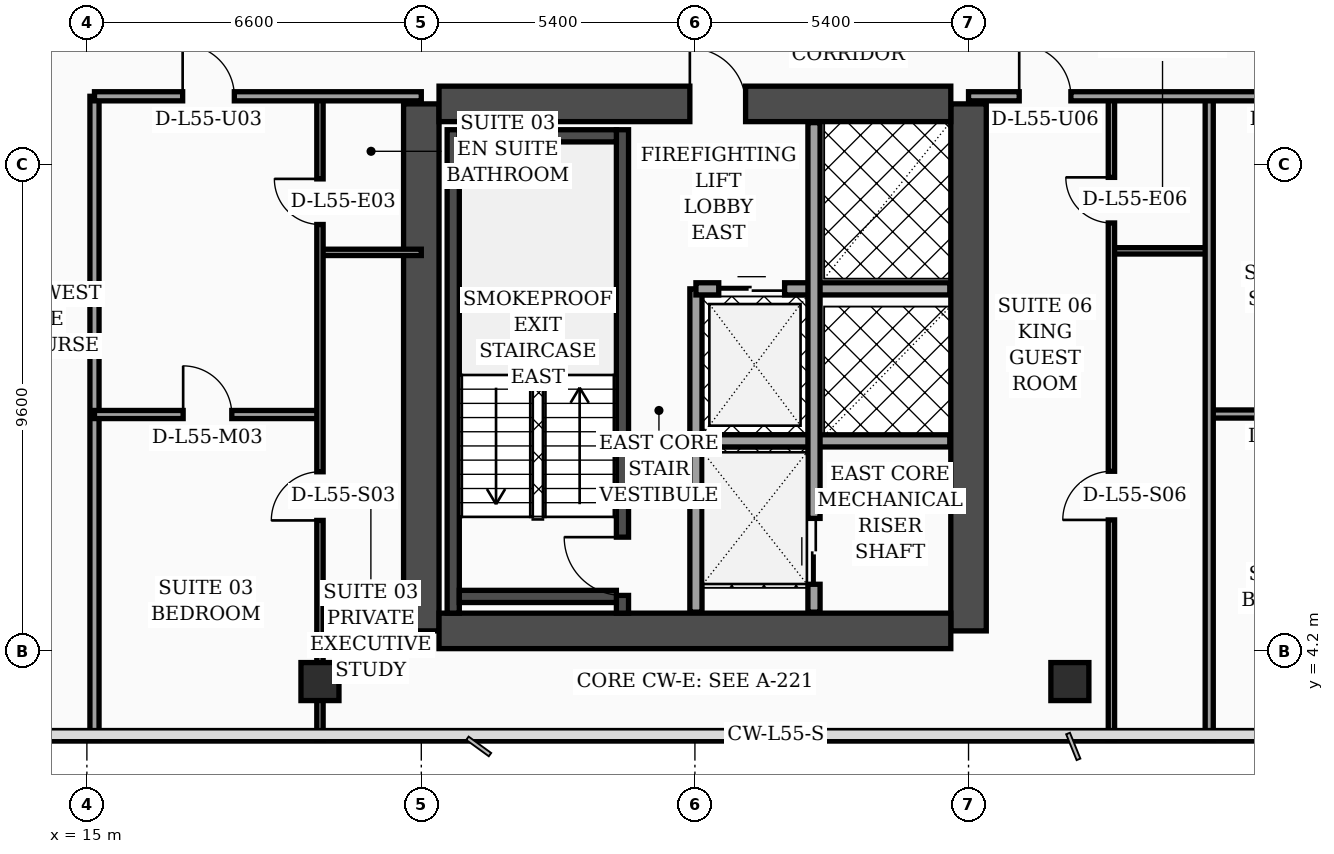
"""IFC4 building model, lengths in metres.
Left out: names, types, materials, properties, quantities, classifications, styles, units other than length and angle.
Written with IfcOpenShell. Run it as: python <this file> out.ifc"""

import sys

from ifc_helpers import new_model, si_unit, direction, frame, frame_2d, origin, origin_2d, place, context, subcontext, project, spatial, rectangle, hollow_rectangle, extrude, element, fill, save


model = new_model("IFC4")
c1 = context("Model", 3, precision=1e-05, world=origin(), true_north=direction((0.0, 1.0)))
c2 = subcontext(c1, "Body", "Model", "MODEL_VIEW")
j1 = project(units=[si_unit("LENGTHUNIT", "METRE"), si_unit("PLANEANGLEUNIT", "RADIAN")], contexts=[c1])
p1 = place(None, origin())
s1 = spatial("IfcSite", under=j1, at=p1, CompositionType="ELEMENT")
p2 = place(p1, origin())
s2 = spatial("IfcBuilding", under=s1, at=p2, CompositionType="ELEMENT")
p3 = place(p2, frame((0.0, 0.0, 223.1)))
s3 = spatial("IfcBuildingStorey", under=s2, at=p3, CompositionType="ELEMENT", Elevation=223.1)
for number, where, z_axis, x_axis in (
    (1, (21.6, 4.6, 0.0), (0.0, 0.0, 1.0), (0.0, 1.0, 0.0)),
    (2, (32.4, 4.6, 0.0), (0.0, 0.0, 1.0), (0.0, 1.0, 0.0)),
):
    element("IfcWall", number, at=place(p3, frame(where, z_axis=z_axis, x_axis=x_axis)), inside=s3, PredefinedType="SHEAR", context=c2, shape_type="SweptSolid", body=[
        extrude(rectangle(XDim=10.4, YDim=0.7, at=frame_2d((5.2, 0.0))), origin(), (0.0, 0.0, 1.0), 3.56),
    ])
p4 = place(p3, frame((21.95, 15.0, 0.0), z_axis=(0.0, 0.0, 1.0), x_axis=(1.0, 0.0, 0.0)))
e3 = element("IfcWall", 3, at=p4, inside=s3, PredefinedType="SHEAR", context=c2, shape_type="SweptSolid", body=[
    extrude(rectangle(XDim=10.1, YDim=0.7, at=frame_2d((5.05, 0.0))), origin(), (0.0, 0.0, 1.0), 3.56),
])
p5 = place(p4, frame((4.95, 0.0, 0.0)))
e4 = element("IfcOpeningElement", 4, at=p5, cuts=e3, PredefinedType="OPENING", context=c2, shape_type="SweptSolid", body=[
    extrude(rectangle(XDim=1.1, YDim=2.2, at=frame_2d((0.55, 1.1))), frame((0.0, 0.36, 0.0), z_axis=(0.0, -1.0, 0.0), x_axis=(1.0, 0.0, 0.0)), (0.0, 0.0, 1.0), 0.72),
])
p6 = place(p3, frame((21.95, 4.6, 0.0), z_axis=(0.0, 0.0, 1.0), x_axis=(1.0, 0.0, 0.0)))
e5 = element("IfcWall", 5, at=p6, inside=s3, PredefinedType="SHEAR", context=c2, shape_type="SweptSolid", body=[
    extrude(rectangle(XDim=10.1, YDim=0.7, at=frame_2d((5.05, 0.0))), origin(), (0.0, 0.0, 1.0), 3.56),
])
p7 = place(p3, frame((22.23, 4.95, 0.0), z_axis=(0.0, 0.0, 1.0), x_axis=(0.0, 1.0, 0.0)))
e6 = element("IfcWall", 6, at=p7, inside=s3, PredefinedType="SOLIDWALL", context=c2, shape_type="SweptSolid", body=[
    extrude(rectangle(XDim=9.54, YDim=0.24, at=frame_2d((4.77, 0.0))), origin(), (0.0, 0.0, 1.0), 3.56),
])
p8 = place(p3, frame((25.57, 4.95, 0.0), z_axis=(0.0, 0.0, 1.0), x_axis=(0.0, 1.0, 0.0)))
e7 = element("IfcWall", 7, at=p8, inside=s3, PredefinedType="SOLIDWALL", context=c2, shape_type="SweptSolid", body=[
    extrude(rectangle(XDim=9.54, YDim=0.24, at=frame_2d((4.77, 0.0))), origin(), (0.0, 0.0, 1.0), 3.56),
])
p9 = place(p8, frame((0.35, 0.0, 0.0)))
e8 = element("IfcOpeningElement", 8, at=p9, cuts=e7, PredefinedType="OPENING", context=c2, shape_type="SweptSolid", body=[
    extrude(rectangle(XDim=1.15, YDim=2.2, at=frame_2d((0.575, 1.1))), frame((0.0, 0.13, 0.0), z_axis=(0.0, -1.0, 0.0), x_axis=(1.0, 0.0, 0.0)), (0.0, 0.0, 1.0), 0.26),
])
for number, where, z_axis, x_axis in (
    (9, (22.35, 5.28, 0.0), (0.0, 0.0, 1.0), (1.0, 0.0, 0.0)),
    (10, (22.35, 14.37, 0.0), (0.0, 0.0, 1.0), (1.0, 0.0, 0.0)),
):
    element("IfcWall", number, at=place(p3, frame(where, z_axis=z_axis, x_axis=x_axis)), inside=s3, PredefinedType="SOLIDWALL", context=c2, shape_type="SweptSolid", body=[
        extrude(rectangle(XDim=3.1, YDim=0.24, at=frame_2d((1.55, 0.0))), origin(), (0.0, 0.0, 1.0), 3.56),
    ])
for number, where, z_axis, x_axis in (
    (11, (19.6, 3.6, 0.0), (0.0, 0.0, 1.0), (1.0, 0.0, 0.0)),
    (12, (34.4, 3.6, 0.0), (0.0, 0.0, 1.0), (1.0, 0.0, 0.0)),
):
    element("IfcColumn", number, at=place(p3, frame(where, z_axis=z_axis, x_axis=x_axis)), inside=s3, PredefinedType="COLUMN", context=c2, shape_type="SweptSolid", body=[
        extrude(hollow_rectangle(XDim=0.75, YDim=0.75, WallThickness=0.032, at=origin_2d()), origin(), (0.0, 0.0, 1.0), 3.56),
    ])
p10 = place(p3, frame((27.02, 4.97, 0.0), z_axis=(0.0, 0.0, 1.0), x_axis=(0.0, 1.0, 0.0)))
e13 = element("IfcWall", 13, at=p10, inside=s3, PredefinedType="SOLIDWALL", context=c2, shape_type="SweptSolid", body=[
    extrude(rectangle(XDim=6.38, YDim=0.24, at=frame_2d((3.19, 0.0))), origin(), (0.0, 0.0, 1.0), 3.56),
])
p11 = place(p3, frame((27.02, 11.35, 0.0), z_axis=(0.0, 0.0, 1.0), x_axis=(1.0, 0.0, 0.0)))
e14 = element("IfcWall", 14, at=p11, inside=s3, PredefinedType="SOLIDWALL", context=c2, shape_type="SweptSolid", body=[
    extrude(rectangle(XDim=5.01, YDim=0.24, at=frame_2d((2.505, 0.0))), origin(), (0.0, 0.0, 1.0), 3.56),
])
p12 = place(p11, frame((0.45, 0.0, 0.0)))
e15 = element("IfcOpeningElement", 15, at=p12, cuts=e14, PredefinedType="OPENING", context=c2, shape_type="SweptSolid", body=[
    extrude(rectangle(XDim=1.3, YDim=2.35, at=frame_2d((0.65, 1.175))), frame((0.0, 0.13, 0.0), z_axis=(0.0, -1.0, 0.0), x_axis=(1.0, 0.0, 0.0)), (0.0, 0.0, 1.0), 0.26),
])
p13 = place(p3, frame((27.02, 8.35, 0.0), z_axis=(0.0, 0.0, 1.0), x_axis=(1.0, 0.0, 0.0)))
e16 = element("IfcWall", 16, at=p13, inside=s3, PredefinedType="SOLIDWALL", context=c2, shape_type="SweptSolid", body=[
    extrude(rectangle(XDim=5.01, YDim=0.24, at=frame_2d((2.505, 0.0))), origin(), (0.0, 0.0, 1.0), 3.56),
])
p14 = place(p3, frame((29.35, 4.97, 0.0), z_axis=(0.0, 0.0, 1.0), x_axis=(0.0, 1.0, 0.0)))
e17 = element("IfcWall", 17, at=p14, inside=s3, PredefinedType="SOLIDWALL", context=c2, shape_type="SweptSolid", body=[
    extrude(rectangle(XDim=9.66, YDim=0.24, at=frame_2d((4.83, 0.0))), origin(), (0.0, 0.0, 1.0), 3.56),
])
p15 = place(p14, frame((0.55, 0.0, 0.0)))
e18 = element("IfcOpeningElement", 18, at=p15, cuts=e17, PredefinedType="OPENING", context=c2, shape_type="SweptSolid", body=[
    extrude(rectangle(XDim=1.3, YDim=2.35, at=frame_2d((0.65, 1.175))), frame((0.0, 0.13, 0.0), z_axis=(0.0, -1.0, 0.0), x_axis=(1.0, 0.0, 0.0)), (0.0, 0.0, 1.0), 0.26),
])
p16 = place(p3, frame((15.15, 2.44, 0.0), z_axis=(0.0, 0.0, 1.0), x_axis=(0.0, 1.0, 0.0)))
e19 = element("IfcWall", 19, at=p16, inside=s3, PredefinedType="PARTITIONING", context=c2, shape_type="SweptSolid", body=[
    extrude(rectangle(XDim=12.71, YDim=0.18, at=frame_2d((6.355, 0.0))), origin(), (0.0, 0.0, 1.0), 3.09),
])
p17 = place(p3, frame((19.6, 12.07, 0.0), z_axis=(0.0, 0.0, 1.0), x_axis=(1.0, 0.0, 0.0)))
e20 = element("IfcWall", 20, at=p17, inside=s3, PredefinedType="PARTITIONING", context=c2, shape_type="SweptSolid", body=[
    extrude(rectangle(XDim=2.0, YDim=0.125, at=frame_2d((1.0, 0.0))), origin(), (0.0, 0.0, 1.0), 3.56),
])
p18 = place(p3, frame((15.15, 8.87, 0.0), z_axis=(0.0, 0.0, 1.0), x_axis=(1.0, 0.0, 0.0)))
e21 = element("IfcWall", 21, at=p18, inside=s3, PredefinedType="PARTITIONING", context=c2, shape_type="SweptSolid", body=[
    extrude(rectangle(XDim=4.45, YDim=0.16, at=frame_2d((2.225, 0.0))), origin(), (0.0, 0.0, 1.0), 3.56),
])
p19 = place(p18, frame((1.75, 0.0, 0.0)))
e22 = element("IfcOpeningElement", 22, at=p19, cuts=e21, PredefinedType="OPENING", context=c2, shape_type="SweptSolid", body=[
    extrude(rectangle(XDim=0.96, YDim=2.2, at=frame_2d((0.48, 1.1))), frame((0.0, 0.09, 0.0), z_axis=(0.0, -1.0, 0.0), x_axis=(1.0, 0.0, 0.0)), (0.0, 0.0, 1.0), 0.18),
])
p20 = place(p3, frame((19.6, 2.44, 0.0), z_axis=(0.0, 0.0, 1.0), x_axis=(0.0, 1.0, 0.0)))
e23 = element("IfcWall", 23, at=p20, inside=s3, PredefinedType="PARTITIONING", context=c2, shape_type="SweptSolid", body=[
    extrude(rectangle(XDim=12.71, YDim=0.125, at=frame_2d((6.355, 0.0))), origin(), (0.0, 0.0, 1.0), 2.59),
])
p21 = place(p20, frame((4.34, 0.0, 0.0)))
e24 = element("IfcOpeningElement", 24, at=p21, cuts=e23, PredefinedType="OPENING", context=c2, shape_type="SweptSolid", body=[
    extrude(rectangle(XDim=0.96, YDim=2.2, at=frame_2d((0.48, 1.1))), frame((0.0, 0.073, 0.0), z_axis=(0.0, -1.0, 0.0), x_axis=(1.0, 0.0, 0.0)), (0.0, 0.0, 1.0), 0.145),
])
p22 = place(p20, frame((10.18, 0.0, 0.0)))
e25 = element("IfcOpeningElement", 25, at=p22, cuts=e23, PredefinedType="OPENING", context=c2, shape_type="SweptSolid", body=[
    extrude(rectangle(XDim=0.9, YDim=2.15, at=frame_2d((0.45, 1.075))), frame((0.0, 0.073, 0.0), z_axis=(0.0, -1.0, 0.0), x_axis=(1.0, 0.0, 0.0)), (0.0, 0.0, 1.0), 0.145),
])
p23 = place(p3, frame((15.15, 15.15, 0.0), z_axis=(0.0, 0.0, 1.0), x_axis=(1.0, 0.0, 0.0)))
e26 = element("IfcWall", 26, at=p23, inside=s3, PredefinedType="PARTITIONING", context=c2, shape_type="SweptSolid", body=[
    extrude(rectangle(XDim=6.45, YDim=0.18, at=frame_2d((3.225, 0.0))), origin(), (0.0, 0.0, 1.0), 2.59),
])
p24 = place(p23, frame((1.74, 0.0, 0.0)))
e27 = element("IfcOpeningElement", 27, at=p24, cuts=e26, PredefinedType="OPENING", context=c2, shape_type="SweptSolid", body=[
    extrude(rectangle(XDim=1.02, YDim=2.2, at=frame_2d((0.51, 1.1))), frame((0.0, 0.1, 0.0), z_axis=(0.0, -1.0, 0.0), x_axis=(1.0, 0.0, 0.0)), (0.0, 0.0, 1.0), 0.2),
])
p25 = place(p3, frame((35.22, 12.1, 0.0), z_axis=(0.0, 0.0, 1.0), x_axis=(1.0, 0.0, 0.0)))
e28 = element("IfcWall", 28, at=p25, inside=s3, PredefinedType="PARTITIONING", context=c2, shape_type="SweptSolid", body=[
    extrude(rectangle(XDim=1.93, YDim=0.125, at=frame_2d((0.965, 0.0))), origin(), (0.0, 0.0, 1.0), 3.56),
])
p26 = place(p3, frame((35.22, 2.44, 0.0), z_axis=(0.0, 0.0, 1.0), x_axis=(0.0, 1.0, 0.0)))
e29 = element("IfcWall", 29, at=p26, inside=s3, PredefinedType="PARTITIONING", context=c2, shape_type="SweptSolid", body=[
    extrude(rectangle(XDim=12.71, YDim=0.125, at=frame_2d((6.355, 0.0))), origin(), (0.0, 0.0, 1.0), 2.94),
])
p27 = place(p26, frame((4.35, 0.0, 0.0)))
e30 = element("IfcOpeningElement", 30, at=p27, cuts=e29, PredefinedType="OPENING", context=c2, shape_type="SweptSolid", body=[
    extrude(rectangle(XDim=0.96, YDim=2.2, at=frame_2d((0.48, 1.1))), frame((0.0, 0.073, 0.0), z_axis=(0.0, -1.0, 0.0), x_axis=(1.0, 0.0, 0.0)), (0.0, 0.0, 1.0), 0.145),
])
p28 = place(p26, frame((10.21, 0.0, 0.0)))
e31 = element("IfcOpeningElement", 31, at=p28, cuts=e29, PredefinedType="OPENING", context=c2, shape_type="SweptSolid", body=[
    extrude(rectangle(XDim=0.9, YDim=2.15, at=frame_2d((0.45, 1.075))), frame((0.0, 0.073, 0.0), z_axis=(0.0, -1.0, 0.0), x_axis=(1.0, 0.0, 0.0)), (0.0, 0.0, 1.0), 0.145),
])
p29 = place(p3, frame((37.15, 8.88, 0.0), z_axis=(0.0, 0.0, 1.0), x_axis=(1.0, 0.0, 0.0)))
e32 = element("IfcWall", 32, at=p29, inside=s3, PredefinedType="PARTITIONING", context=c2, shape_type="SweptSolid", body=[
    extrude(rectangle(XDim=3.72, YDim=0.16, at=frame_2d((1.86, 0.0))), origin(), (0.0, 0.0, 1.0), 2.94),
])
p30 = place(p29, frame((1.38, 0.0, 0.0)))
e33 = element("IfcOpeningElement", 33, at=p30, cuts=e32, PredefinedType="OPENING", context=c2, shape_type="SweptSolid", body=[
    extrude(rectangle(XDim=0.96, YDim=2.2, at=frame_2d((0.48, 1.1))), frame((0.0, 0.09, 0.0), z_axis=(0.0, -1.0, 0.0), x_axis=(1.0, 0.0, 0.0)), (0.0, 0.0, 1.0), 0.18),
])
p31 = place(p3, frame((37.15, 2.44, 0.0), z_axis=(0.0, 0.0, 1.0), x_axis=(0.0, 1.0, 0.0)))
e34 = element("IfcWall", 34, at=p31, inside=s3, PredefinedType="PARTITIONING", context=c2, shape_type="SweptSolid", body=[
    extrude(rectangle(XDim=12.71, YDim=0.16, at=frame_2d((6.355, 0.0))), origin(), (0.0, 0.0, 1.0), 2.94),
])
p32 = place(p3, frame((32.4, 15.15, 0.0), z_axis=(0.0, 0.0, 1.0), x_axis=(1.0, 0.0, 0.0)))
e35 = element("IfcWall", 35, at=p32, inside=s3, PredefinedType="PARTITIONING", context=c2, shape_type="SweptSolid", body=[
    extrude(rectangle(XDim=10.4, YDim=0.18, at=frame_2d((5.2, 0.0))), origin(), (0.0, 0.0, 1.0), 2.94),
])
p33 = place(p32, frame((1.0, 0.0, 0.0)))
e36 = element("IfcOpeningElement", 36, at=p33, cuts=e35, PredefinedType="OPENING", context=c2, shape_type="SweptSolid", body=[
    extrude(rectangle(XDim=1.02, YDim=2.2, at=frame_2d((0.51, 1.1))), frame((0.0, 0.1, 0.0), z_axis=(0.0, -1.0, 0.0), x_axis=(1.0, 0.0, 0.0)), (0.0, 0.0, 1.0), 0.2),
])
p34 = place(p32, frame((6.1, 0.0, 0.0)))
e37 = element("IfcOpeningElement", 37, at=p34, cuts=e35, PredefinedType="OPENING", context=c2, shape_type="SweptSolid", body=[
    extrude(rectangle(XDim=1.02, YDim=2.2, at=frame_2d((0.51, 1.1))), frame((0.0, 0.1, 0.0), z_axis=(0.0, -1.0, 0.0), x_axis=(1.0, 0.0, 0.0)), (0.0, 0.0, 1.0), 0.2),
])
p35 = place(p12, origin())
e38 = element("IfcDoor", 38, at=p35, inside=s3, OperationType="DOUBLE_DOOR_SLIDING", PredefinedType="DOOR", context=c2, shape_type="SweptSolid", body=[
    extrude(rectangle(XDim=1.3, YDim=2.35, at=frame_2d((0.65, 1.175))), frame((0.0, 0.025, 0.0), z_axis=(0.0, -1.0, 0.0), x_axis=(1.0, 0.0, 0.0)), (0.0, 0.0, 1.0), 0.05),
])
fill(e15, e38)
p36 = place(p15, origin())
e39 = element("IfcDoor", 39, at=p36, inside=s3, OperationType="DOUBLE_DOOR_SLIDING", PredefinedType="DOOR", context=c2, shape_type="SweptSolid", body=[
    extrude(rectangle(XDim=1.3, YDim=2.35, at=frame_2d((0.65, 1.175))), frame((0.0, 0.025, 0.0), z_axis=(0.0, -1.0, 0.0), x_axis=(1.0, 0.0, 0.0)), (0.0, 0.0, 1.0), 0.05),
])
fill(e18, e39)
p37 = place(p19, origin())
e40 = element("IfcDoor", 40, at=p37, inside=s3, OperationType="SINGLE_SWING_LEFT", PredefinedType="DOOR", context=c2, shape_type="SweptSolid", body=[
    extrude(rectangle(XDim=0.96, YDim=2.2, at=frame_2d((0.48, 1.1))), frame((0.0, 0.025, 0.0), z_axis=(0.0, -1.0, 0.0), x_axis=(1.0, 0.0, 0.0)), (0.0, 0.0, 1.0), 0.05),
])
fill(e22, e40)
p38 = place(p21, origin())
e41 = element("IfcDoor", 41, at=p38, inside=s3, OperationType="SINGLE_SWING_LEFT", PredefinedType="DOOR", context=c2, shape_type="SweptSolid", body=[
    extrude(rectangle(XDim=0.96, YDim=2.2, at=frame_2d((0.48, 1.1))), frame((0.0, 0.025, 0.0), z_axis=(0.0, -1.0, 0.0), x_axis=(1.0, 0.0, 0.0)), (0.0, 0.0, 1.0), 0.05),
])
fill(e24, e41)
p39 = place(p22, origin())
e42 = element("IfcDoor", 42, at=p39, inside=s3, OperationType="SINGLE_SWING_RIGHT", PredefinedType="DOOR", context=c2, shape_type="SweptSolid", body=[
    extrude(rectangle(XDim=0.9, YDim=2.15, at=frame_2d((0.45, 1.075))), frame((0.0, 0.025, 0.0), z_axis=(0.0, -1.0, 0.0), x_axis=(1.0, 0.0, 0.0)), (0.0, 0.0, 1.0), 0.05),
])
fill(e25, e42)
p40 = place(p24, origin())
e43 = element("IfcDoor", 43, at=p40, inside=s3, OperationType="SINGLE_SWING_LEFT", PredefinedType="DOOR", context=c2, shape_type="SweptSolid", body=[
    extrude(rectangle(XDim=1.02, YDim=2.2, at=frame_2d((0.51, 1.1))), frame((0.0, 0.025, 0.0), z_axis=(0.0, -1.0, 0.0), x_axis=(1.0, 0.0, 0.0)), (0.0, 0.0, 1.0), 0.05),
])
fill(e27, e43)
p41 = place(p27, origin())
e44 = element("IfcDoor", 44, at=p41, inside=s3, OperationType="SINGLE_SWING_LEFT", PredefinedType="DOOR", context=c2, shape_type="SweptSolid", body=[
    extrude(rectangle(XDim=0.96, YDim=2.2, at=frame_2d((0.48, 1.1))), frame((0.0, 0.025, 0.0), z_axis=(0.0, -1.0, 0.0), x_axis=(1.0, 0.0, 0.0)), (0.0, 0.0, 1.0), 0.05),
])
fill(e30, e44)
p42 = place(p28, origin())
e45 = element("IfcDoor", 45, at=p42, inside=s3, OperationType="SINGLE_SWING_RIGHT", PredefinedType="DOOR", context=c2, shape_type="SweptSolid", body=[
    extrude(rectangle(XDim=0.9, YDim=2.15, at=frame_2d((0.45, 1.075))), frame((0.0, 0.025, 0.0), z_axis=(0.0, -1.0, 0.0), x_axis=(1.0, 0.0, 0.0)), (0.0, 0.0, 1.0), 0.05),
])
fill(e31, e45)
p43 = place(p33, origin())
e46 = element("IfcDoor", 46, at=p43, inside=s3, OperationType="SINGLE_SWING_LEFT", PredefinedType="DOOR", context=c2, shape_type="SweptSolid", body=[
    extrude(rectangle(XDim=1.02, YDim=2.2, at=frame_2d((0.51, 1.1))), frame((0.0, 0.025, 0.0), z_axis=(0.0, -1.0, 0.0), x_axis=(1.0, 0.0, 0.0)), (0.0, 0.0, 1.0), 0.05),
])
fill(e36, e46)
p44 = place(p9, origin())
e47 = element("IfcDoor", 47, at=p44, inside=s3, OperationType="SINGLE_SWING_RIGHT", PredefinedType="DOOR", context=c2, shape_type="SweptSolid", body=[
    extrude(rectangle(XDim=1.15, YDim=2.2, at=frame_2d((0.575, 1.1))), frame((0.0, 0.025, 0.0), z_axis=(0.0, -1.0, 0.0), x_axis=(1.0, 0.0, 0.0)), (0.0, 0.0, 1.0), 0.05),
])
fill(e8, e47)
p45 = place(p5, origin())
e48 = element("IfcDoor", 48, at=p45, inside=s3, OperationType="SINGLE_SWING_LEFT", PredefinedType="DOOR", context=c2, shape_type="SweptSolid", body=[
    extrude(rectangle(XDim=1.1, YDim=2.2, at=frame_2d((0.55, 1.1))), frame((0.0, 0.025, 0.0), z_axis=(0.0, -1.0, 0.0), x_axis=(1.0, 0.0, 0.0)), (0.0, 0.0, 1.0), 0.05),
])
fill(e4, e48)
save(model, sys.argv[1])
